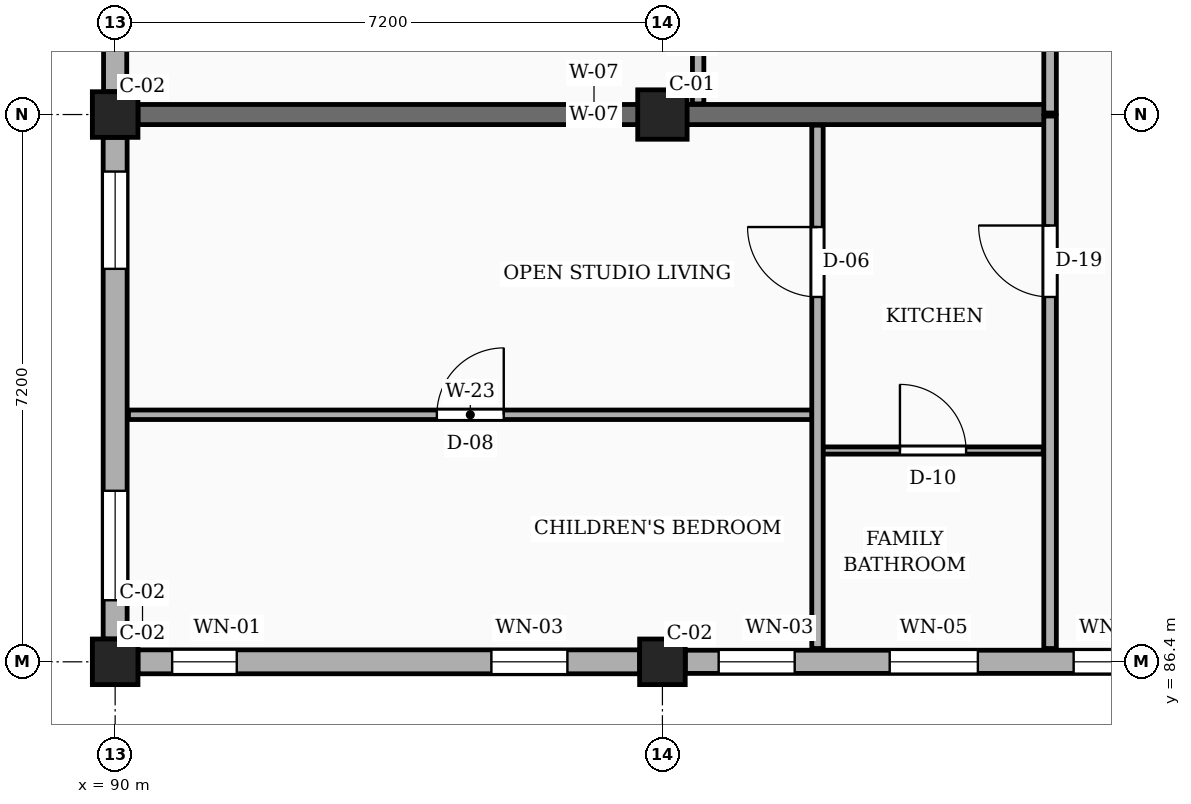
"""IFC4 building model, lengths in metres.
Left out: names, types, materials, properties, quantities, classifications, styles, units other than length and angle.
Written with IfcOpenShell. Run it as: python <this file> out.ifc"""

import sys

from ifc_helpers import new_model, si_unit, direction, frame, frame_2d, origin, origin_2d, place, context, subcontext, project, spatial, rectangle, extrude, element, fill, save


model = new_model("IFC4")
c1 = context("Model", 3, precision=1e-05, world=origin(), true_north=direction((0.0, 1.0)))
c2 = subcontext(c1, "Body", "Model", "MODEL_VIEW")
j1 = project(units=[si_unit("LENGTHUNIT", "METRE"), si_unit("PLANEANGLEUNIT", "RADIAN")], contexts=[c1])
p1 = place(None, origin())
s1 = spatial("IfcSite", under=j1, at=p1, CompositionType="ELEMENT")
p2 = place(p1, origin())
s2 = spatial("IfcBuilding", under=s1, at=p2, CompositionType="ELEMENT")
p3 = place(p2, frame((0.0, 0.0, 4.5)))
s3 = spatial("IfcBuildingStorey", under=s2, at=p3, CompositionType="ELEMENT", Elevation=4.5)
for number, where, z_axis, x_axis in (
    (1, (90.0, 86.4, 0.0), (0.0, 0.0, 1.0), (1.0, 0.0, 0.0)),
    (2, (90.0, 93.6, 0.0), (0.0, 0.0, 1.0), (1.0, 0.0, 0.0)),
    (3, (97.2, 86.4, 0.0), (0.0, 0.0, 1.0), (1.0, 0.0, 0.0)),
):
    element("IfcColumn", number, at=place(p3, frame(where, z_axis=z_axis, x_axis=x_axis)), inside=s3, PredefinedType="COLUMN", context=c2, shape_type="SweptSolid", body=[
        extrude(rectangle(XDim=0.6, YDim=0.6, at=origin_2d()), origin(), (0.0, 0.0, 1.0), 3.15),
    ])
p4 = place(p3, frame((97.2, 93.6, 0.0), z_axis=(0.0, 0.0, 1.0), x_axis=(1.0, 0.0, 0.0)))
e4 = element("IfcColumn", 4, at=p4, inside=s3, PredefinedType="COLUMN", context=c2, shape_type="SweptSolid", body=[
    extrude(rectangle(XDim=0.65, YDim=0.65, at=origin_2d()), origin(), (0.0, 0.0, 1.0), 3.15),
])
p5 = place(p3, frame((90.3, 93.6, 0.0), z_axis=(0.0, 0.0, 1.0), x_axis=(1.0, 0.0, 0.0)))
e5 = element("IfcWall", 5, at=p5, inside=s3, PredefinedType="SOLIDWALL", context=c2, shape_type="SweptSolid", body=[
    extrude(rectangle(XDim=12.0, YDim=0.265, at=frame_2d((6.0, 0.0))), origin(), (0.0, 0.0, 1.0), 2.19),
])
p6 = place(p3, frame((90.3, 86.4, 0.0), z_axis=(0.0, 0.0, 1.0), x_axis=(1.0, 0.0, 0.0)))
e6 = element("IfcWall", 6, at=p6, inside=s3, PredefinedType="SOLIDWALL", context=c2, shape_type="SweptSolid", body=[
    extrude(rectangle(XDim=6.6, YDim=0.315, at=frame_2d((3.3, 0.0))), origin(), (0.0, 0.0, 1.0), 2.46),
])
p7 = place(p6, frame((0.45, 0.0, 0.78)))
e7 = element("IfcOpeningElement", 7, at=p7, cuts=e6, PredefinedType="OPENING", context=c2, shape_type="SweptSolid", body=[
    extrude(rectangle(XDim=0.85, YDim=1.15, at=frame_2d((0.425, 0.575))), frame((0.0, 0.167, 0.0), z_axis=(0.0, -1.0, 0.0), x_axis=(1.0, 0.0, 0.0)), (0.0, 0.0, 1.0), 0.335),
])
p8 = place(p6, frame((4.65, 0.0, 0.78)))
e8 = element("IfcOpeningElement", 8, at=p8, cuts=e6, PredefinedType="OPENING", context=c2, shape_type="SweptSolid", body=[
    extrude(rectangle(XDim=1.0, YDim=1.15, at=frame_2d((0.5, 0.575))), frame((0.0, 0.167, 0.0), z_axis=(0.0, -1.0, 0.0), x_axis=(1.0, 0.0, 0.0)), (0.0, 0.0, 1.0), 0.335),
])
p9 = place(p3, frame((97.5, 86.4, 0.0), z_axis=(0.0, 0.0, 1.0), x_axis=(1.0, 0.0, 0.0)))
e9 = element("IfcWall", 9, at=p9, inside=s3, PredefinedType="SOLIDWALL", context=c2, shape_type="SweptSolid", body=[
    extrude(rectangle(XDim=6.6, YDim=0.305, at=frame_2d((3.3, 0.0))), origin(), (0.0, 0.0, 1.0), 2.46),
])
p10 = place(p9, frame((0.44, 0.0, 0.78)))
e10 = element("IfcOpeningElement", 10, at=p10, cuts=e9, PredefinedType="OPENING", context=c2, shape_type="SweptSolid", body=[
    extrude(rectangle(XDim=1.0, YDim=1.15, at=frame_2d((0.5, 0.575))), frame((0.0, 0.163, 0.0), z_axis=(0.0, -1.0, 0.0), x_axis=(1.0, 0.0, 0.0)), (0.0, 0.0, 1.0), 0.325),
])
p11 = place(p9, frame((2.69, 0.0, 0.78)))
e11 = element("IfcOpeningElement", 11, at=p11, cuts=e9, PredefinedType="OPENING", context=c2, shape_type="SweptSolid", body=[
    extrude(rectangle(XDim=1.16, YDim=1.15, at=frame_2d((0.58, 0.575))), frame((0.0, 0.163, 0.0), z_axis=(0.0, -1.0, 0.0), x_axis=(1.0, 0.0, 0.0)), (0.0, 0.0, 1.0), 0.325),
])
p12 = place(p9, frame((5.11, 0.0, 0.78)))
e12 = element("IfcOpeningElement", 12, at=p12, cuts=e9, PredefinedType="OPENING", context=c2, shape_type="SweptSolid", body=[
    extrude(rectangle(XDim=1.04, YDim=1.26, at=frame_2d((0.52, 0.63))), frame((0.0, 0.163, 0.0), z_axis=(0.0, -1.0, 0.0), x_axis=(1.0, 0.0, 0.0)), (0.0, 0.0, 1.0), 0.325),
])
p13 = place(p3, frame((90.0, 100.5, 0.0), z_axis=(0.0, 0.0, 1.0), x_axis=(0.0, -1.0, 0.0)))
e13 = element("IfcWall", 13, at=p13, inside=s3, PredefinedType="SOLIDWALL", context=c2, shape_type="SweptSolid", body=[
    extrude(rectangle(XDim=6.6, YDim=0.305, at=frame_2d((3.3, 0.0))), origin(), (0.0, 0.0, 1.0), 2.46),
])
p14 = place(p13, frame((0.45, 0.0, 0.78)))
e14 = element("IfcOpeningElement", 14, at=p14, cuts=e13, PredefinedType="OPENING", context=c2, shape_type="SweptSolid", body=[
    extrude(rectangle(XDim=1.12, YDim=1.26, at=frame_2d((0.56, 0.63))), frame((0.0, 0.163, 0.0), z_axis=(0.0, -1.0, 0.0), x_axis=(1.0, 0.0, 0.0)), (0.0, 0.0, 1.0), 0.325),
])
p15 = place(p13, frame((4.65, 0.0, 0.78)))
e15 = element("IfcOpeningElement", 15, at=p15, cuts=e13, PredefinedType="OPENING", context=c2, shape_type="SweptSolid", body=[
    extrude(rectangle(XDim=1.28, YDim=1.26, at=frame_2d((0.64, 0.63))), frame((0.0, 0.163, 0.0), z_axis=(0.0, -1.0, 0.0), x_axis=(1.0, 0.0, 0.0)), (0.0, 0.0, 1.0), 0.325),
])
p16 = place(p3, frame((90.0, 93.3, 0.0), z_axis=(0.0, 0.0, 1.0), x_axis=(0.0, -1.0, 0.0)))
e16 = element("IfcWall", 16, at=p16, inside=s3, PredefinedType="SOLIDWALL", context=c2, shape_type="SweptSolid", body=[
    extrude(rectangle(XDim=6.6, YDim=0.315, at=frame_2d((3.3, 0.0))), origin(), (0.0, 0.0, 1.0), 2.46),
])
p17 = place(p16, frame((0.45, 0.0, 0.78)))
e17 = element("IfcOpeningElement", 17, at=p17, cuts=e16, PredefinedType="OPENING", context=c2, shape_type="SweptSolid", body=[
    extrude(rectangle(XDim=1.28, YDim=1.26, at=frame_2d((0.64, 0.63))), frame((0.0, 0.167, 0.0), z_axis=(0.0, -1.0, 0.0), x_axis=(1.0, 0.0, 0.0)), (0.0, 0.0, 1.0), 0.335),
])
p18 = place(p16, frame((4.65, 0.0, 0.78)))
e18 = element("IfcOpeningElement", 18, at=p18, cuts=e16, PredefinedType="OPENING", context=c2, shape_type="SweptSolid", body=[
    extrude(rectangle(XDim=1.44, YDim=1.26, at=frame_2d((0.72, 0.63))), frame((0.0, 0.167, 0.0), z_axis=(0.0, -1.0, 0.0), x_axis=(1.0, 0.0, 0.0)), (0.0, 0.0, 1.0), 0.335),
])
p19 = place(p3, frame((102.3, 86.575, 0.0), z_axis=(0.0, 0.0, 1.0), x_axis=(0.0, 1.0, 0.0)))
e19 = element("IfcWall", 19, at=p19, inside=s3, PredefinedType="PARTITIONING", context=c2, shape_type="SweptSolid", body=[
    extrude(rectangle(XDim=7.005, YDim=0.165, at=frame_2d((3.502, 0.0))), origin(), (0.0, 0.0, 1.0), 2.325),
])
p20 = place(p19, frame((4.625, 0.0, 0.0)))
e20 = element("IfcOpeningElement", 20, at=p20, cuts=e19, PredefinedType="OPENING", context=c2, shape_type="SweptSolid", body=[
    extrude(rectangle(XDim=0.94, YDim=2.12, at=frame_2d((0.47, 1.06))), frame((0.0, 0.093, 0.0), z_axis=(0.0, -1.0, 0.0), x_axis=(1.0, 0.0, 0.0)), (0.0, 0.0, 1.0), 0.185),
])
p21 = place(p3, frame((102.3, 93.62, 0.0), z_axis=(0.0, 0.0, 1.0), x_axis=(0.0, 1.0, 0.0)))
e21 = element("IfcWall", 21, at=p21, inside=s3, PredefinedType="PARTITIONING", context=c2, shape_type="SweptSolid", body=[
    extrude(rectangle(XDim=7.16, YDim=0.165, at=frame_2d((3.58, 0.0))), origin(), (0.0, 0.0, 1.0), 2.325),
])
p22 = place(p21, frame((4.78, 0.0, 0.0)))
e22 = element("IfcOpeningElement", 22, at=p22, cuts=e21, PredefinedType="OPENING", context=c2, shape_type="SweptSolid", body=[
    extrude(rectangle(XDim=1.14, YDim=2.18, at=frame_2d((0.57, 1.09))), frame((0.0, 0.093, 0.0), z_axis=(0.0, -1.0, 0.0), x_axis=(1.0, 0.0, 0.0)), (0.0, 0.0, 1.0), 0.185),
])
p23 = place(p3, frame((90.175, 89.65, 0.0), z_axis=(0.0, 0.0, 1.0), x_axis=(1.0, 0.0, 0.0)))
e23 = element("IfcWall", 23, at=p23, inside=s3, PredefinedType="PARTITIONING", context=c2, shape_type="SweptSolid", body=[
    extrude(rectangle(XDim=8.995, YDim=0.125, at=frame_2d((4.498, 0.0))), origin(), (0.0, 0.0, 1.0), 2.325),
])
p24 = place(p23, frame((4.058, 0.0, 0.0)))
e24 = element("IfcOpeningElement", 24, at=p24, cuts=e23, PredefinedType="OPENING", context=c2, shape_type="SweptSolid", body=[
    extrude(rectangle(XDim=0.88, YDim=2.08, at=frame_2d((0.44, 1.04))), frame((0.0, 0.073, 0.0), z_axis=(0.0, -1.0, 0.0), x_axis=(1.0, 0.0, 0.0)), (0.0, 0.0, 1.0), 0.145),
])
p25 = place(p3, frame((99.31, 89.18, 0.0), z_axis=(0.0, 0.0, 1.0), x_axis=(1.0, 0.0, 0.0)))
e25 = element("IfcWall", 25, at=p25, inside=s3, PredefinedType="PARTITIONING", context=c2, shape_type="SweptSolid", body=[
    extrude(rectangle(XDim=2.9, YDim=0.095, at=frame_2d((1.45, 0.0))), origin(), (0.0, 0.0, 1.0), 2.325),
])
p26 = place(p25, frame((1.015, 0.0, 0.0)))
e26 = element("IfcOpeningElement", 26, at=p26, cuts=e25, PredefinedType="OPENING", context=c2, shape_type="SweptSolid", body=[
    extrude(rectangle(XDim=0.87, YDim=2.05, at=frame_2d((0.435, 1.025))), frame((0.0, 0.058, 0.0), z_axis=(0.0, -1.0, 0.0), x_axis=(1.0, 0.0, 0.0)), (0.0, 0.0, 1.0), 0.115),
])
p27 = place(p3, frame((99.24, 86.575, 0.0), z_axis=(0.0, 0.0, 1.0), x_axis=(0.0, 1.0, 0.0)))
e27 = element("IfcWall", 27, at=p27, inside=s3, PredefinedType="PARTITIONING", context=c2, shape_type="SweptSolid", body=[
    extrude(rectangle(XDim=6.885, YDim=0.15, at=frame_2d((3.442, 0.0))), origin(), (0.0, 0.0, 1.0), 2.325),
])
p28 = place(p27, frame((4.625, 0.0, 0.0)))
e28 = element("IfcOpeningElement", 28, at=p28, cuts=e27, PredefinedType="OPENING", context=c2, shape_type="SweptSolid", body=[
    extrude(rectangle(XDim=0.92, YDim=2.1, at=frame_2d((0.46, 1.05))), frame((0.0, 0.085, 0.0), z_axis=(0.0, -1.0, 0.0), x_axis=(1.0, 0.0, 0.0)), (0.0, 0.0, 1.0), 0.17),
])
p29 = place(p3, frame((97.67, 93.74, 0.0), z_axis=(0.0, 0.0, 1.0), x_axis=(0.0, 1.0, 0.0)))
e29 = element("IfcWall", 29, at=p29, inside=s3, PredefinedType="PARTITIONING", context=c2, shape_type="SweptSolid", body=[
    extrude(rectangle(XDim=6.92, YDim=0.15, at=frame_2d((3.46, 0.0))), origin(), (0.0, 0.0, 1.0), 2.325),
])
p30 = place(p29, frame((4.66, 0.0, 0.0)))
e30 = element("IfcOpeningElement", 30, at=p30, cuts=e29, PredefinedType="OPENING", context=c2, shape_type="SweptSolid", body=[
    extrude(rectangle(XDim=0.95, YDim=2.1, at=frame_2d((0.475, 1.05))), frame((0.0, 0.085, 0.0), z_axis=(0.0, -1.0, 0.0), x_axis=(1.0, 0.0, 0.0)), (0.0, 0.0, 1.0), 0.17),
])
p31 = place(p7, origin())
e31 = element("IfcWindow", 31, at=p31, inside=s3, PartitioningType="SINGLE_PANEL", PredefinedType="WINDOW", context=c2, shape_type="SweptSolid", body=[
    extrude(rectangle(XDim=0.85, YDim=1.15, at=frame_2d((0.425, 0.575))), frame((0.0, 0.03, 0.0), z_axis=(0.0, -1.0, 0.0), x_axis=(1.0, 0.0, 0.0)), (0.0, 0.0, 1.0), 0.06),
])
fill(e7, e31)
p32 = place(p8, origin())
e32 = element("IfcWindow", 32, at=p32, inside=s3, PartitioningType="SINGLE_PANEL", PredefinedType="WINDOW", context=c2, shape_type="SweptSolid", body=[
    extrude(rectangle(XDim=1.0, YDim=1.15, at=frame_2d((0.5, 0.575))), frame((0.0, 0.03, 0.0), z_axis=(0.0, -1.0, 0.0), x_axis=(1.0, 0.0, 0.0)), (0.0, 0.0, 1.0), 0.06),
])
fill(e8, e32)
p33 = place(p10, origin())
e33 = element("IfcWindow", 33, at=p33, inside=s3, PartitioningType="SINGLE_PANEL", PredefinedType="WINDOW", context=c2, shape_type="SweptSolid", body=[
    extrude(rectangle(XDim=1.0, YDim=1.15, at=frame_2d((0.5, 0.575))), frame((0.0, 0.03, 0.0), z_axis=(0.0, -1.0, 0.0), x_axis=(1.0, 0.0, 0.0)), (0.0, 0.0, 1.0), 0.06),
])
fill(e10, e33)
p34 = place(p11, origin())
e34 = element("IfcWindow", 34, at=p34, inside=s3, PartitioningType="SINGLE_PANEL", PredefinedType="WINDOW", context=c2, shape_type="SweptSolid", body=[
    extrude(rectangle(XDim=1.16, YDim=1.15, at=frame_2d((0.58, 0.575))), frame((0.0, 0.03, 0.0), z_axis=(0.0, -1.0, 0.0), x_axis=(1.0, 0.0, 0.0)), (0.0, 0.0, 1.0), 0.06),
])
fill(e11, e34)
p35 = place(p12, origin())
e35 = element("IfcWindow", 35, at=p35, inside=s3, PartitioningType="SINGLE_PANEL", PredefinedType="WINDOW", context=c2, shape_type="SweptSolid", body=[
    extrude(rectangle(XDim=1.04, YDim=1.26, at=frame_2d((0.52, 0.63))), frame((0.0, 0.03, 0.0), z_axis=(0.0, -1.0, 0.0), x_axis=(1.0, 0.0, 0.0)), (0.0, 0.0, 1.0), 0.06),
])
fill(e12, e35)
p36 = place(p17, origin())
e36 = element("IfcWindow", 36, at=p36, inside=s3, PartitioningType="SINGLE_PANEL", PredefinedType="WINDOW", context=c2, shape_type="SweptSolid", body=[
    extrude(rectangle(XDim=1.28, YDim=1.26, at=frame_2d((0.64, 0.63))), frame((0.0, 0.03, 0.0), z_axis=(0.0, -1.0, 0.0), x_axis=(1.0, 0.0, 0.0)), (0.0, 0.0, 1.0), 0.06),
])
fill(e17, e36)
p37 = place(p18, origin())
e37 = element("IfcWindow", 37, at=p37, inside=s3, PartitioningType="SINGLE_PANEL", PredefinedType="WINDOW", context=c2, shape_type="SweptSolid", body=[
    extrude(rectangle(XDim=1.44, YDim=1.26, at=frame_2d((0.72, 0.63))), frame((0.0, 0.03, 0.0), z_axis=(0.0, -1.0, 0.0), x_axis=(1.0, 0.0, 0.0)), (0.0, 0.0, 1.0), 0.06),
])
fill(e18, e37)
p38 = place(p20, origin())
e38 = element("IfcDoor", 38, at=p38, inside=s3, OperationType="SINGLE_SWING_RIGHT", PredefinedType="DOOR", context=c2, shape_type="SweptSolid", body=[
    extrude(rectangle(XDim=0.94, YDim=2.12, at=frame_2d((0.47, 1.06))), frame((0.0, 0.025, 0.0), z_axis=(0.0, -1.0, 0.0), x_axis=(1.0, 0.0, 0.0)), (0.0, 0.0, 1.0), 0.05),
])
fill(e20, e38)
p39 = place(p24, origin())
e39 = element("IfcDoor", 39, at=p39, inside=s3, OperationType="SINGLE_SWING_RIGHT", PredefinedType="DOOR", context=c2, shape_type="SweptSolid", body=[
    extrude(rectangle(XDim=0.88, YDim=2.08, at=frame_2d((0.44, 1.04))), frame((0.0, 0.025, 0.0), z_axis=(0.0, -1.0, 0.0), x_axis=(1.0, 0.0, 0.0)), (0.0, 0.0, 1.0), 0.05),
])
fill(e24, e39)
p40 = place(p26, origin())
e40 = element("IfcDoor", 40, at=p40, inside=s3, OperationType="SINGLE_SWING_LEFT", PredefinedType="DOOR", context=c2, shape_type="SweptSolid", body=[
    extrude(rectangle(XDim=0.87, YDim=2.05, at=frame_2d((0.435, 1.025))), frame((0.0, 0.025, 0.0), z_axis=(0.0, -1.0, 0.0), x_axis=(1.0, 0.0, 0.0)), (0.0, 0.0, 1.0), 0.05),
])
fill(e26, e40)
p41 = place(p28, origin())
e41 = element("IfcDoor", 41, at=p41, inside=s3, OperationType="SINGLE_SWING_RIGHT", PredefinedType="DOOR", context=c2, shape_type="SweptSolid", body=[
    extrude(rectangle(XDim=0.92, YDim=2.1, at=frame_2d((0.46, 1.05))), frame((0.0, 0.025, 0.0), z_axis=(0.0, -1.0, 0.0), x_axis=(1.0, 0.0, 0.0)), (0.0, 0.0, 1.0), 0.05),
])
fill(e28, e41)
save(model, sys.argv[1])
